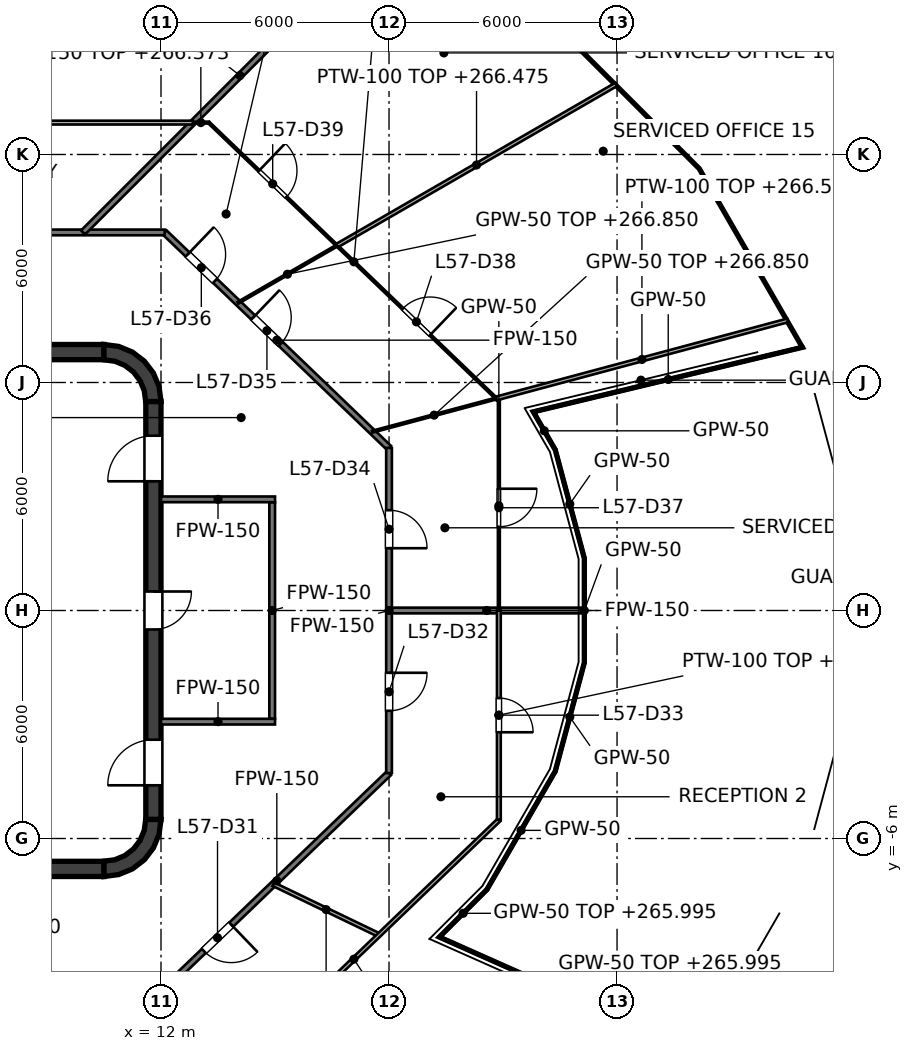
"""IFC4 building model, lengths in metres.
Left out: names, types, materials, properties, quantities, classifications, styles, units other than length and angle.
Written with IfcOpenShell. Run it as: python <this file> out.ifc"""

import sys

from ifc_helpers import new_model, si_unit, direction, frame, frame_2d, origin, place, context, subcontext, project, spatial, polyline, rectangle, outline, extrude, element, fill, save


model = new_model("IFC4")
c1 = context("Model", 3, precision=1e-05, world=origin(), true_north=direction((0.0, 1.0)))
c2 = subcontext(c1, "Body", "Model", "MODEL_VIEW")
j1 = project(units=[si_unit("LENGTHUNIT", "METRE"), si_unit("PLANEANGLEUNIT", "RADIAN")], contexts=[c1])
p1 = place(None, origin())
s1 = spatial("IfcSite", under=j1, at=p1, CompositionType="ELEMENT")
p2 = place(p1, origin())
s2 = spatial("IfcBuilding", under=s1, at=p2, CompositionType="ELEMENT")
p3 = place(p2, frame((0.0, 0.0, 263.0)))
s3 = spatial("IfcBuildingStorey", under=s2, at=p3, CompositionType="ELEMENT", Elevation=263.0)
for number, where, z_axis, x_axis in (
    (1, (-10.5, 6.8, 0.0), (0.0, 0.0, 1.0), (1.0, 0.0, 0.0)),
    (2, (-10.5, -6.8, 0.0), (0.0, 0.0, 1.0), (1.0, 0.0, 0.0)),
):
    element("IfcWall", number, at=place(p3, frame(where, z_axis=z_axis, x_axis=x_axis)), inside=s3, PredefinedType="SHEAR", context=c2, shape_type="SweptSolid", body=[
        extrude(rectangle(XDim=21.0, YDim=0.4, at=frame_2d((10.5, 0.0))), origin(), (0.0, 0.0, 1.0), 4.0),
    ])
p4 = place(p3, frame((11.8, -5.5, 0.0), z_axis=(0.0, 0.0, 1.0), x_axis=(0.0, 1.0, 0.0)))
e3 = element("IfcWall", 3, at=p4, inside=s3, PredefinedType="SHEAR", context=c2, shape_type="SweptSolid", body=[
    extrude(rectangle(XDim=11.0, YDim=0.4, at=frame_2d((5.5, 0.0))), origin(), (0.0, 0.0, 1.0), 4.0),
])
p5 = place(p4, frame((5.0, 0.0, 0.0)))
e4 = element("IfcOpeningElement", 4, at=p5, cuts=e3, PredefinedType="OPENING", context=c2, shape_type="SweptSolid", body=[
    extrude(rectangle(XDim=1.0, YDim=2.1, at=frame_2d((0.5, 1.05))), frame((0.0, 0.2, 0.0), z_axis=(0.0, -1.0, 0.0), x_axis=(1.0, 0.0, 0.0)), (0.0, 0.0, 1.0), 0.4),
])
p6 = place(p4, frame((0.9, 0.0, 0.0)))
e5 = element("IfcOpeningElement", 5, at=p6, cuts=e3, PredefinedType="OPENING", context=c2, shape_type="SweptSolid", body=[
    extrude(rectangle(XDim=1.2, YDim=2.1, at=frame_2d((0.6, 1.05))), frame((0.0, 0.2, 0.0), z_axis=(0.0, -1.0, 0.0), x_axis=(1.0, 0.0, 0.0)), (0.0, 0.0, 1.0), 0.4),
])
p7 = place(p4, frame((8.9, 0.0, 0.0)))
e6 = element("IfcOpeningElement", 6, at=p7, cuts=e3, PredefinedType="OPENING", context=c2, shape_type="SweptSolid", body=[
    extrude(rectangle(XDim=1.2, YDim=2.1, at=frame_2d((0.6, 1.05))), frame((0.0, 0.2, 0.0), z_axis=(0.0, -1.0, 0.0), x_axis=(1.0, 0.0, 0.0)), (0.0, 0.0, 1.0), 0.4),
])
p8 = place(p3, origin())
e7 = element("IfcWall", 7, at=p8, inside=s3, PredefinedType="SHEAR", context=c2, shape_type="SweptSolid", body=[
    extrude(outline(polyline([(10.5, 7.0), (10.5, 6.596), (10.784, 6.559), (11.048, 6.45), (11.275, 6.275), (11.45, 6.048), (11.559, 5.784), (11.596, 5.5), (12.0, 5.5), (11.949, 5.888), (11.799, 6.25), (11.561, 6.561), (11.25, 6.799), (10.888, 6.949), (10.5, 7.0)])), origin(), (0.0, 0.0, 1.0), 4.0),
])
e8 = element("IfcWall", 8, at=p8, inside=s3, PredefinedType="SHEAR", context=c2, shape_type="SweptSolid", body=[
    extrude(outline(polyline([(12.0, -5.5), (11.596, -5.5), (11.559, -5.784), (11.45, -6.048), (11.275, -6.275), (11.048, -6.45), (10.784, -6.559), (10.5, -6.596), (10.5, -7.0), (10.888, -6.949), (11.25, -6.799), (11.561, -6.561), (11.799, -6.25), (11.949, -5.888), (12.0, -5.5)])), origin(), (0.0, 0.0, 1.0), 4.0),
])
p9 = place(p3, frame((14.925, -2.85, 0.0), z_axis=(0.0, 0.0, 1.0), x_axis=(0.0, 1.0, 0.0)))
e9 = element("IfcWall", 9, at=p9, inside=s3, PredefinedType="PARTITIONING", context=c2, shape_type="SweptSolid", body=[
    extrude(rectangle(XDim=5.7, YDim=0.15, at=frame_2d((2.85, 0.0))), origin(), (0.0, 0.0, 1.0), 2.918),
])
for number, where, z_axis, x_axis in (
    (10, (12.0, 2.925, 0.0), (0.0, 0.0, 1.0), (1.0, 0.0, 0.0)),
    (11, (12.0, -2.925, 0.0), (0.0, 0.0, 1.0), (1.0, 0.0, 0.0)),
):
    element("IfcWall", number, at=place(p3, frame(where, z_axis=z_axis, x_axis=x_axis)), inside=s3, PredefinedType="PARTITIONING", context=c2, shape_type="SweptSolid", body=[
        extrude(rectangle(XDim=3.0, YDim=0.15, at=frame_2d((1.5, 0.0))), origin(), (0.0, 0.0, 1.0), 2.918),
    ])
p10 = place(p3, frame((12.095, 9.949, 0.0), z_axis=(0.0, 0.0, 1.0), x_axis=(0.721290181137, -0.692633001376, 0.0)))
e12 = element("IfcWall", 12, at=p10, inside=s3, PredefinedType="PARTITIONING", context=c2, shape_type="SweptSolid", body=[
    extrude(rectangle(XDim=8.187, YDim=0.15, at=frame_2d((4.094, 0.0))), origin(), (0.0, 0.0, 1.0), 2.918),
])
p11 = place(p10, frame((3.232, 0.0, 0.0)))
e13 = element("IfcOpeningElement", 13, at=p11, cuts=e12, PredefinedType="OPENING", context=c2, shape_type="SweptSolid", body=[
    extrude(rectangle(XDim=1.0, YDim=2.1, at=frame_2d((0.5, 1.05))), frame((0.0, 0.075, 0.0), z_axis=(0.0, -1.0, 0.0), x_axis=(1.0, 0.0, 0.0)), (0.0, 0.0, 1.0), 0.15),
])
p12 = place(p10, frame((0.839, 0.0, 0.0)))
e14 = element("IfcOpeningElement", 14, at=p12, cuts=e12, PredefinedType="OPENING", context=c2, shape_type="SweptSolid", body=[
    extrude(rectangle(XDim=1.0, YDim=2.1, at=frame_2d((0.5, 1.05))), frame((0.0, 0.075, 0.0), z_axis=(0.0, -1.0, 0.0), x_axis=(1.0, 0.0, 0.0)), (0.0, 0.0, 1.0), 0.15),
])
p13 = place(p3, frame((18.0, 0.0, 0.0), z_axis=(0.0, 0.0, 1.0), x_axis=(1.0, 0.0, 0.0)))
e15 = element("IfcWall", 15, at=p13, inside=s3, PredefinedType="PARTITIONING", context=c2, shape_type="SweptSolid", body=[
    extrude(rectangle(XDim=5.139, YDim=0.15, at=frame_2d((2.569, 0.0))), origin(), (0.0, 0.0, 1.0), 2.918),
])
p14 = place(p3, frame((-12.095, 9.949, 0.0), z_axis=(0.0, 0.0, 1.0), x_axis=(1.0, 0.0, 0.0)))
e16 = element("IfcWall", 16, at=p14, inside=s3, PredefinedType="PARTITIONING", context=c2, shape_type="SweptSolid", body=[
    extrude(rectangle(XDim=24.19, YDim=0.15, at=frame_2d((12.095, 0.0))), origin(), (0.0, 0.0, 1.0), 2.927),
])
p15 = place(p14, frame((9.784, 0.0, 0.0)))
e17 = element("IfcOpeningElement", 17, at=p15, cuts=e16, PredefinedType="OPENING", context=c2, shape_type="SweptSolid", body=[
    extrude(rectangle(XDim=1.0, YDim=2.1, at=frame_2d((0.5, 1.05))), frame((0.0, 0.075, 0.0), z_axis=(0.0, -1.0, 0.0), x_axis=(1.0, 0.0, 0.0)), (0.0, 0.0, 1.0), 0.15),
])
p16 = place(p14, frame((5.56, 0.0, 0.0)))
e18 = element("IfcOpeningElement", 18, at=p16, cuts=e16, PredefinedType="OPENING", context=c2, shape_type="SweptSolid", body=[
    extrude(rectangle(XDim=1.0, YDim=2.1, at=frame_2d((0.5, 1.05))), frame((0.0, 0.075, 0.0), z_axis=(0.0, -1.0, 0.0), x_axis=(1.0, 0.0, 0.0)), (0.0, 0.0, 1.0), 0.15),
])
p17 = place(p14, frame((1.322, 0.0, 0.0)))
e19 = element("IfcOpeningElement", 19, at=p17, cuts=e16, PredefinedType="OPENING", context=c2, shape_type="SweptSolid", body=[
    extrude(rectangle(XDim=1.0, YDim=2.1, at=frame_2d((0.5, 1.05))), frame((0.0, 0.075, 0.0), z_axis=(0.0, -1.0, 0.0), x_axis=(1.0, 0.0, 0.0)), (0.0, 0.0, 1.0), 0.15),
])
p18 = place(p14, frame((19.104, 0.0, 0.0)))
e20 = element("IfcOpeningElement", 20, at=p18, cuts=e16, PredefinedType="OPENING", context=c2, shape_type="SweptSolid", body=[
    extrude(rectangle(XDim=1.0, YDim=2.1, at=frame_2d((0.5, 1.05))), frame((0.0, 0.075, 0.0), z_axis=(0.0, -1.0, 0.0), x_axis=(1.0, 0.0, 0.0)), (0.0, 0.0, 1.0), 0.15),
])
p19 = place(p14, frame((14.129, 0.0, 0.0)))
e21 = element("IfcOpeningElement", 21, at=p19, cuts=e16, PredefinedType="OPENING", context=c2, shape_type="SweptSolid", body=[
    extrude(rectangle(XDim=1.0, YDim=2.1, at=frame_2d((0.5, 1.05))), frame((0.0, 0.075, 0.0), z_axis=(0.0, -1.0, 0.0), x_axis=(1.0, 0.0, 0.0)), (0.0, 0.0, 1.0), 0.15),
])
p20 = place(p3, frame((12.095, -9.949, 0.0), z_axis=(0.0, 0.0, 1.0), x_axis=(0.721260976692, 0.69266341285, 0.0)))
e22 = element("IfcWall", 22, at=p20, inside=s3, PredefinedType="PARTITIONING", context=c2, shape_type="SweptSolid", body=[
    extrude(rectangle(XDim=8.187, YDim=0.15, at=frame_2d((4.094, 0.0))), origin(), (0.0, 0.0, 1.0), 2.918),
])
p21 = place(p20, frame((1.43, 0.0, 0.0)))
e23 = element("IfcOpeningElement", 23, at=p21, cuts=e22, PredefinedType="OPENING", context=c2, shape_type="SweptSolid", body=[
    extrude(rectangle(XDim=1.0, YDim=2.1, at=frame_2d((0.5, 1.05))), frame((0.0, 0.075, 0.0), z_axis=(0.0, -1.0, 0.0), x_axis=(1.0, 0.0, 0.0)), (0.0, 0.0, 1.0), 0.15),
])
p22 = place(p3, frame((9.949, 9.949, 0.0), z_axis=(0.0, 0.0, 1.0), x_axis=(0.707106781187, 0.707106781187, 0.0)))
e24 = element("IfcWall", 24, at=p22, inside=s3, PredefinedType="PARTITIONING", context=c2, shape_type="SweptSolid", body=[
    extrude(rectangle(XDim=11.677, YDim=0.15, at=frame_2d((5.839, 0.0))), origin(), (0.0, 0.0, 1.0), 3.373),
])
p23 = place(p3, frame((18.0, -4.278, 0.0), z_axis=(0.0, 0.0, 1.0), x_axis=(0.0, 1.0, 0.0)))
e25 = element("IfcWall", 25, at=p23, inside=s3, PredefinedType="PARTITIONING", context=c2, shape_type="SweptSolid", body=[
    extrude(rectangle(XDim=8.556, YDim=0.15, at=frame_2d((4.278, 0.0))), origin(), (0.0, 0.0, 1.0), 2.918),
])
p24 = place(p23, frame((1.639, 0.0, 0.0)))
e26 = element("IfcOpeningElement", 26, at=p24, cuts=e25, PredefinedType="OPENING", context=c2, shape_type="SweptSolid", body=[
    extrude(rectangle(XDim=1.0, YDim=2.1, at=frame_2d((0.5, 1.05))), frame((0.0, 0.075, 0.0), z_axis=(0.0, -1.0, 0.0), x_axis=(1.0, 0.0, 0.0)), (0.0, 0.0, 1.0), 0.15),
])
p25 = place(p23, frame((5.917, 0.0, 0.0)))
e27 = element("IfcOpeningElement", 27, at=p25, cuts=e25, PredefinedType="OPENING", context=c2, shape_type="SweptSolid", body=[
    extrude(rectangle(XDim=1.0, YDim=2.1, at=frame_2d((0.5, 1.05))), frame((0.0, 0.075, 0.0), z_axis=(0.0, -1.0, 0.0), x_axis=(1.0, 0.0, 0.0)), (0.0, 0.0, 1.0), 0.15),
])
p26 = place(p3, frame((22.374, 4.229, 0.0), z_axis=(0.0, 0.0, 1.0), x_axis=(0.258871000297, -0.965911903439, 0.0)))
e28 = element("IfcWall", 28, at=p26, inside=s3, PredefinedType="PARTITIONING", context=c2, shape_type="SweptSolid", body=[
    extrude(rectangle(XDim=2.955, YDim=0.05, at=frame_2d((1.478, 0.0))), origin(), (0.0, 0.0, 1.0), 2.918),
])
p27 = place(p3, frame((21.797, 5.228, 0.0), z_axis=(0.0, 0.0, 1.0), x_axis=(0.500076612374, -0.865981167091, 0.0)))
e29 = element("IfcWall", 29, at=p27, inside=s3, PredefinedType="PARTITIONING", context=c2, shape_type="SweptSolid", body=[
    extrude(rectangle(XDim=1.154, YDim=0.05, at=frame_2d((0.577, 0.0))), origin(), (0.0, 0.0, 1.0), 2.918),
])
p28 = place(p3, frame((13.258, 12.839, 0.0), z_axis=(0.0, 0.0, 1.0), x_axis=(0.721469843217, -0.692445857327, 0.0)))
e30 = element("IfcWall", 30, at=p28, inside=s3, PredefinedType="PARTITIONING", context=c2, shape_type="SweptSolid", body=[
    extrude(rectangle(XDim=10.582, YDim=0.05, at=frame_2d((5.291, 0.0))), origin(), (0.0, 0.0, 1.0), 2.927),
])
p29 = place(p28, frame((7.072, 0.0, 0.0)))
e31 = element("IfcOpeningElement", 31, at=p29, cuts=e30, PredefinedType="OPENING", context=c2, shape_type="SweptSolid", body=[
    extrude(rectangle(XDim=1.0, YDim=2.1, at=frame_2d((0.5, 1.05))), frame((0.0, 0.025, 0.0), z_axis=(0.0, -1.0, 0.0), x_axis=(1.0, 0.0, 0.0)), (0.0, 0.0, 1.0), 0.05),
])
p30 = place(p28, frame((1.83, 0.0, 0.0)))
e32 = element("IfcOpeningElement", 32, at=p30, cuts=e30, PredefinedType="OPENING", context=c2, shape_type="SweptSolid", body=[
    extrude(rectangle(XDim=1.0, YDim=2.1, at=frame_2d((0.5, 1.05))), frame((0.0, 0.025, 0.0), z_axis=(0.0, -1.0, 0.0), x_axis=(1.0, 0.0, 0.0)), (0.0, 0.0, 1.0), 0.05),
])
p31 = place(p3, frame((19.325, -8.594, 0.0), z_axis=(0.0, 0.0, 1.0), x_axis=(0.913724263299, -0.406334801191, 0.0)))
e33 = element("IfcWall", 33, at=p31, inside=s3, PredefinedType="PARTITIONING", context=c2, shape_type="SweptSolid", body=[
    extrude(rectangle(XDim=7.499, YDim=0.05, at=frame_2d((3.75, 0.0))), origin(), (0.0, 0.0, 1.0), 2.995),
])
p32 = place(p3, frame((12.839, 12.839, 0.0), z_axis=(0.0, 0.0, 1.0), x_axis=(1.0, 0.0, 0.0)))
e34 = element("IfcWall", 34, at=p32, inside=s3, PredefinedType="PARTITIONING", context=c2, shape_type="SweptSolid", body=[
    extrude(rectangle(XDim=0.419, YDim=0.05, at=frame_2d((0.209, 0.0))), origin(), (0.0, 0.0, 1.0), 3.85),
])
p33 = place(p3, frame((21.797, 5.228, 0.0), z_axis=(0.0, 0.0, 1.0), x_axis=(0.972420983146, 0.233232569631, 0.0)))
e35 = element("IfcWall", 35, at=p33, inside=s3, PredefinedType="PARTITIONING", context=c2, shape_type="SweptSolid", body=[
    extrude(rectangle(XDim=7.301, YDim=0.05, at=frame_2d((3.651, 0.0))), origin(), (0.0, 0.0, 1.0), 2.918),
])
p34 = place(p3, frame((17.556, 4.704, 0.0), z_axis=(0.0, 0.0, 1.0), x_axis=(0.965949987261, 0.258728858285, 0.0)))
e36 = element("IfcWall", 36, at=p34, inside=s3, PredefinedType="PARTITIONING", context=c2, shape_type="SweptSolid", body=[
    extrude(rectangle(XDim=3.377, YDim=0.05, at=frame_2d((1.688, 0.0))), origin(), (0.0, 0.0, 1.0), 3.85),
])
p35 = place(p3, frame((14.024, 8.097, 0.0), z_axis=(0.0, 0.0, 1.0), x_axis=(0.86600176378, 0.500040943453, 0.0)))
e37 = element("IfcWall", 37, at=p35, inside=s3, PredefinedType="PARTITIONING", context=c2, shape_type="SweptSolid", body=[
    extrude(rectangle(XDim=3.008, YDim=0.05, at=frame_2d((1.504, 0.0))), origin(), (0.0, 0.0, 1.0), 3.85),
])
p36 = place(p3, frame((19.325, -8.594, 0.0), z_axis=(0.0, 0.0, 1.0), x_axis=(0.707106781187, 0.707106781187, 0.0)))
e38 = element("IfcWall", 38, at=p36, inside=s3, PredefinedType="PARTITIONING", context=c2, shape_type="SweptSolid", body=[
    extrude(rectangle(XDim=1.769, YDim=0.05, at=frame_2d((0.885, 0.0))), origin(), (0.0, 0.0, 1.0), 2.995),
])
p37 = place(p3, frame((20.576, -7.343, 0.0), z_axis=(0.0, 0.0, 1.0), x_axis=(0.500045691691, 0.865999022067, 0.0)))
e39 = element("IfcWall", 39, at=p37, inside=s3, PredefinedType="PARTITIONING", context=c2, shape_type="SweptSolid", body=[
    extrude(rectangle(XDim=3.596, YDim=0.05, at=frame_2d((1.798, 0.0))), origin(), (0.0, 0.0, 1.0), 2.918),
])
p38 = place(p3, frame((22.374, -4.229, 0.0), z_axis=(0.0, 0.0, 1.0), x_axis=(0.258871000297, 0.965911903439, 0.0)))
e40 = element("IfcWall", 40, at=p38, inside=s3, PredefinedType="PARTITIONING", context=c2, shape_type="SweptSolid", body=[
    extrude(rectangle(XDim=2.955, YDim=0.05, at=frame_2d((1.478, 0.0))), origin(), (0.0, 0.0, 1.0), 2.918),
])
p39 = place(p3, frame((23.139, -1.375, 0.0), z_axis=(0.0, 0.0, 1.0), x_axis=(0.0, 1.0, 0.0)))
e41 = element("IfcWall", 41, at=p39, inside=s3, PredefinedType="PARTITIONING", context=c2, shape_type="SweptSolid", body=[
    extrude(rectangle(XDim=2.75, YDim=0.05, at=frame_2d((1.375, 0.0))), origin(), (0.0, 0.0, 1.0), 2.918),
])
p40 = place(p3, frame((20.89, 0.0, 0.0), z_axis=(0.0, 0.0, 1.0), x_axis=(0.0, 1.0, 0.0)))
e42 = element("IfcWall", 42, at=p40, inside=s3, PredefinedType="PARTITIONING", context=c2, shape_type="SweptSolid", body=[
    extrude(rectangle(XDim=5.509, YDim=0.05, at=frame_2d((2.754, 0.0))), origin(), (0.0, 0.0, 1.0), 2.918),
])
p41 = place(p40, frame((2.204, 0.0, 0.0)))
e43 = element("IfcOpeningElement", 43, at=p41, cuts=e42, PredefinedType="OPENING", context=c2, shape_type="SweptSolid", body=[
    extrude(rectangle(XDim=1.0, YDim=2.1, at=frame_2d((0.5, 1.05))), frame((0.0, 0.025, 0.0), z_axis=(0.0, -1.0, 0.0), x_axis=(1.0, 0.0, 0.0)), (0.0, 0.0, 1.0), 0.05),
])
p42 = place(p3, frame((14.955, -7.202, 0.0), z_axis=(0.0, 0.0, 1.0), x_axis=(0.900977603602, -0.433865598783, 0.0)))
e44 = element("IfcWall", 44, at=p42, inside=s3, PredefinedType="PARTITIONING", context=c2, shape_type="SweptSolid", body=[
    extrude(rectangle(XDim=3.084, YDim=0.1, at=frame_2d((1.542, 0.0))), origin(), (0.0, 0.0, 1.0), 3.85),
])
p43 = place(p3, frame((0.0, 12.839, 0.0), z_axis=(0.0, 0.0, 1.0), x_axis=(1.0, 0.0, 0.0)))
e45 = element("IfcWall", 45, at=p43, inside=s3, PredefinedType="PARTITIONING", context=c2, shape_type="SweptSolid", body=[
    extrude(rectangle(XDim=12.839, YDim=0.1, at=frame_2d((6.419, 0.0))), origin(), (0.0, 0.0, 1.0), 2.927),
])
p44 = place(p43, frame((2.32, 0.0, 0.0)))
e46 = element("IfcOpeningElement", 46, at=p44, cuts=e45, PredefinedType="OPENING", context=c2, shape_type="SweptSolid", body=[
    extrude(rectangle(XDim=1.8, YDim=2.1, at=frame_2d((0.9, 1.05))), frame((0.0, 0.05, 0.0), z_axis=(0.0, -1.0, 0.0), x_axis=(1.0, 0.0, 0.0)), (0.0, 0.0, 1.0), 0.1),
])
p45 = place(p3, frame((20.818, 5.578, 0.0), z_axis=(0.0, 0.0, 1.0), x_axis=(0.965918966196, 0.258844645962, 0.0)))
e47 = element("IfcWall", 47, at=p45, inside=s3, PredefinedType="PARTITIONING", context=c2, shape_type="SweptSolid", body=[
    extrude(rectangle(XDim=7.944, YDim=0.1, at=frame_2d((3.972, 0.0))), origin(), (0.0, 0.0, 1.0), 3.527),
])
p46 = place(p3, frame((16.629, 9.601, 0.0), z_axis=(0.0, 0.0, 1.0), x_axis=(0.866022649921, 0.500004769801, 0.0)))
e48 = element("IfcWall", 48, at=p46, inside=s3, PredefinedType="PARTITIONING", context=c2, shape_type="SweptSolid", body=[
    extrude(rectangle(XDim=8.484, YDim=0.1, at=frame_2d((4.242, 0.0))), origin(), (0.0, 0.0, 1.0), 3.475),
])
p47 = place(p3, frame((13.258, -12.839, 0.0), z_axis=(0.0, 0.0, 1.0), x_axis=(0.721435728401, 0.692481400318, 0.0)))
e49 = element("IfcWall", 49, at=p47, inside=s3, PredefinedType="PARTITIONING", context=c2, shape_type="SweptSolid", body=[
    extrude(rectangle(XDim=10.582, YDim=0.1, at=frame_2d((5.291, 0.0))), origin(), (0.0, 0.0, 1.0), 2.927),
])
p48 = place(p3, frame((20.89, -5.509, 0.0), z_axis=(0.0, 0.0, 1.0), x_axis=(0.0, 1.0, 0.0)))
e50 = element("IfcWall", 50, at=p48, inside=s3, PredefinedType="PARTITIONING", context=c2, shape_type="SweptSolid", body=[
    extrude(rectangle(XDim=5.509, YDim=0.1, at=frame_2d((2.754, 0.0))), origin(), (0.0, 0.0, 1.0), 2.918),
])
p49 = place(p48, frame((2.304, 0.0, 0.0)))
e51 = element("IfcOpeningElement", 51, at=p49, cuts=e50, PredefinedType="OPENING", context=c2, shape_type="SweptSolid", body=[
    extrude(rectangle(XDim=0.9, YDim=2.1, at=frame_2d((0.45, 1.05))), frame((0.0, 0.05, 0.0), z_axis=(0.0, -1.0, 0.0), x_axis=(1.0, 0.0, 0.0)), (0.0, 0.0, 1.0), 0.1),
])
p50 = place(p5, origin())
e52 = element("IfcDoor", 52, at=p50, inside=s3, OperationType="SINGLE_SWING_RIGHT", PredefinedType="DOOR", context=c2, shape_type="SweptSolid", body=[
    extrude(rectangle(XDim=1.0, YDim=2.1, at=frame_2d((0.5, 1.05))), frame((0.0, 0.025, 0.0), z_axis=(0.0, -1.0, 0.0), x_axis=(1.0, 0.0, 0.0)), (0.0, 0.0, 1.0), 0.05),
])
fill(e4, e52)
p51 = place(p6, origin())
e53 = element("IfcDoor", 53, at=p51, inside=s3, OperationType="SINGLE_SWING_LEFT", PredefinedType="DOOR", context=c2, shape_type="SweptSolid", body=[
    extrude(rectangle(XDim=1.2, YDim=2.1, at=frame_2d((0.6, 1.05))), frame((0.0, 0.025, 0.0), z_axis=(0.0, -1.0, 0.0), x_axis=(1.0, 0.0, 0.0)), (0.0, 0.0, 1.0), 0.05),
])
fill(e5, e53)
p52 = place(p7, origin())
e54 = element("IfcDoor", 54, at=p52, inside=s3, OperationType="SINGLE_SWING_LEFT", PredefinedType="DOOR", context=c2, shape_type="SweptSolid", body=[
    extrude(rectangle(XDim=1.2, YDim=2.1, at=frame_2d((0.6, 1.05))), frame((0.0, 0.025, 0.0), z_axis=(0.0, -1.0, 0.0), x_axis=(1.0, 0.0, 0.0)), (0.0, 0.0, 1.0), 0.05),
])
fill(e6, e54)
p53 = place(p21, origin())
e55 = element("IfcDoor", 55, at=p53, inside=s3, OperationType="SINGLE_SWING_RIGHT", PredefinedType="DOOR", context=c2, shape_type="SweptSolid", body=[
    extrude(rectangle(XDim=1.0, YDim=2.1, at=frame_2d((0.5, 1.05))), frame((0.0, 0.025, 0.0), z_axis=(0.0, -1.0, 0.0), x_axis=(1.0, 0.0, 0.0)), (0.0, 0.0, 1.0), 0.05),
])
fill(e23, e55)
p54 = place(p24, origin())
e56 = element("IfcDoor", 56, at=p54, inside=s3, OperationType="SINGLE_SWING_RIGHT", PredefinedType="DOOR", context=c2, shape_type="SweptSolid", body=[
    extrude(rectangle(XDim=1.0, YDim=2.1, at=frame_2d((0.5, 1.05))), frame((0.0, 0.025, 0.0), z_axis=(0.0, -1.0, 0.0), x_axis=(1.0, 0.0, 0.0)), (0.0, 0.0, 1.0), 0.05),
])
fill(e26, e56)
p55 = place(p49, origin())
e57 = element("IfcDoor", 57, at=p55, inside=s3, OperationType="SINGLE_SWING_LEFT", PredefinedType="DOOR", context=c2, shape_type="SweptSolid", body=[
    extrude(rectangle(XDim=0.9, YDim=2.1, at=frame_2d((0.45, 1.05))), frame((0.0, 0.025, 0.0), z_axis=(0.0, -1.0, 0.0), x_axis=(1.0, 0.0, 0.0)), (0.0, 0.0, 1.0), 0.05),
])
fill(e51, e57)
p56 = place(p25, origin())
e58 = element("IfcDoor", 58, at=p56, inside=s3, OperationType="SINGLE_SWING_LEFT", PredefinedType="DOOR", context=c2, shape_type="SweptSolid", body=[
    extrude(rectangle(XDim=1.0, YDim=2.1, at=frame_2d((0.5, 1.05))), frame((0.0, 0.025, 0.0), z_axis=(0.0, -1.0, 0.0), x_axis=(1.0, 0.0, 0.0)), (0.0, 0.0, 1.0), 0.05),
])
fill(e27, e58)
p57 = place(p11, origin())
e59 = element("IfcDoor", 59, at=p57, inside=s3, OperationType="SINGLE_SWING_LEFT", PredefinedType="DOOR", context=c2, shape_type="SweptSolid", body=[
    extrude(rectangle(XDim=1.0, YDim=2.1, at=frame_2d((0.5, 1.05))), frame((0.0, 0.025, 0.0), z_axis=(0.0, -1.0, 0.0), x_axis=(1.0, 0.0, 0.0)), (0.0, 0.0, 1.0), 0.05),
])
fill(e13, e59)
p58 = place(p12, origin())
e60 = element("IfcDoor", 60, at=p58, inside=s3, OperationType="SINGLE_SWING_LEFT", PredefinedType="DOOR", context=c2, shape_type="SweptSolid", body=[
    extrude(rectangle(XDim=1.0, YDim=2.1, at=frame_2d((0.5, 1.05))), frame((0.0, 0.025, 0.0), z_axis=(0.0, -1.0, 0.0), x_axis=(1.0, 0.0, 0.0)), (0.0, 0.0, 1.0), 0.05),
])
fill(e14, e60)
p59 = place(p41, origin())
e61 = element("IfcDoor", 61, at=p59, inside=s3, OperationType="SINGLE_SWING_RIGHT", PredefinedType="DOOR", context=c2, shape_type="SweptSolid", body=[
    extrude(rectangle(XDim=1.0, YDim=2.1, at=frame_2d((0.5, 1.05))), frame((0.0, 0.025, 0.0), z_axis=(0.0, -1.0, 0.0), x_axis=(1.0, 0.0, 0.0)), (0.0, 0.0, 1.0), 0.05),
])
fill(e43, e61)
p60 = place(p29, origin())
e62 = element("IfcDoor", 62, at=p60, inside=s3, OperationType="SINGLE_SWING_RIGHT", PredefinedType="DOOR", context=c2, shape_type="SweptSolid", body=[
    extrude(rectangle(XDim=1.0, YDim=2.1, at=frame_2d((0.5, 1.05))), frame((0.0, 0.025, 0.0), z_axis=(0.0, -1.0, 0.0), x_axis=(1.0, 0.0, 0.0)), (0.0, 0.0, 1.0), 0.05),
])
fill(e31, e62)
p61 = place(p30, origin())
e63 = element("IfcDoor", 63, at=p61, inside=s3, OperationType="SINGLE_SWING_LEFT", PredefinedType="DOOR", context=c2, shape_type="SweptSolid", body=[
    extrude(rectangle(XDim=1.0, YDim=2.1, at=frame_2d((0.5, 1.05))), frame((0.0, 0.025, 0.0), z_axis=(0.0, -1.0, 0.0), x_axis=(1.0, 0.0, 0.0)), (0.0, 0.0, 1.0), 0.05),
])
fill(e32, e63)
save(model, sys.argv[1])
